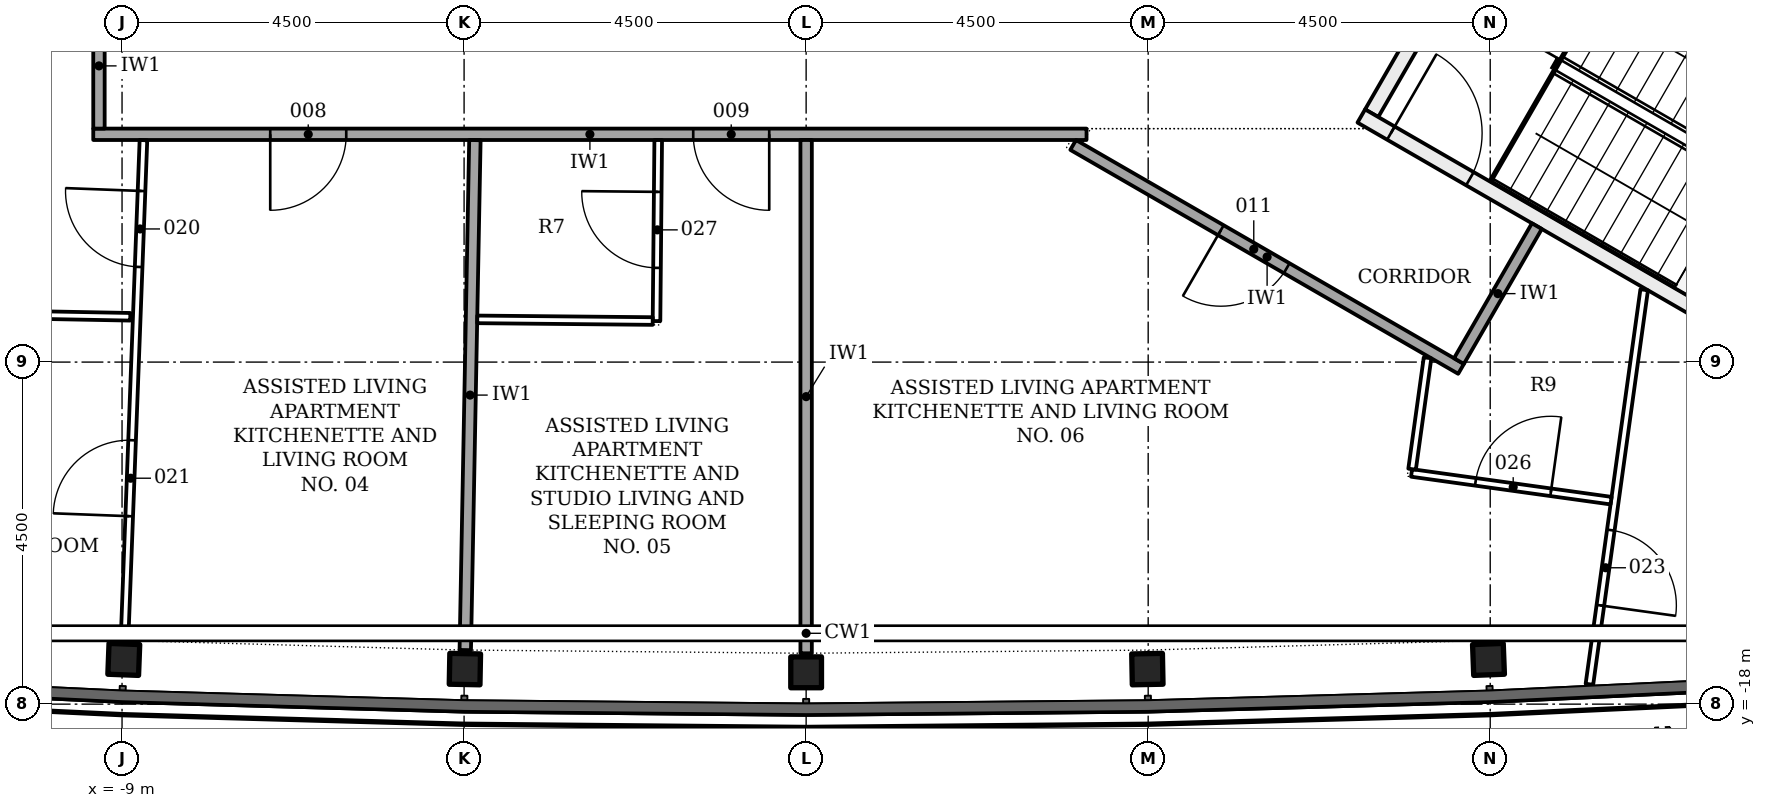
"""IFC4 building model, lengths in metres.
Left out: names, types, materials, properties, quantities, classifications, styles, units other than length and angle.
Written with IfcOpenShell. Run it as: python <this file> out.ifc"""

import sys

from ifc_helpers import new_model, si_unit, direction, frame, frame_2d, origin, origin_2d, place, context, subcontext, project, spatial, rectangle, i_section, extrude, element, fill, save


model = new_model("IFC4")
c1 = context("Model", 3, precision=1e-05, world=origin(), true_north=direction((0.0, 1.0)))
c2 = subcontext(c1, "Body", "Model", "MODEL_VIEW")
j1 = project(units=[si_unit("LENGTHUNIT", "METRE"), si_unit("PLANEANGLEUNIT", "RADIAN")], contexts=[c1])
p1 = place(None, origin())
s1 = spatial("IfcSite", under=j1, at=p1, CompositionType="ELEMENT")
p2 = place(p1, origin())
s2 = spatial("IfcBuilding", under=s1, at=p2, CompositionType="ELEMENT")
p3 = place(p2, frame((0.0, 0.0, 45.6)))
s3 = spatial("IfcBuildingStorey", under=s2, at=p3, CompositionType="ELEMENT", Elevation=45.6)
for number, where, z_axis, x_axis in (
    (1, (-9.922, -5.728, -0.2), (0.0, 0.0, 1.0), (-0.866, -0.5, 0.0)),
    (2, (9.922, -5.728, -0.2), (0.0, 0.0, 1.0), (0.866, -0.5, 0.0)),
):
    element("IfcWall", number, at=place(p3, frame(where, z_axis=z_axis, x_axis=x_axis)), inside=s3, PredefinedType="SHEAR", context=c2, shape_type="SweptSolid", body=[
        extrude(rectangle(XDim=14.013, YDim=0.85, at=frame_2d((7.007, 0.0))), origin(), (0.0, 0.0, 1.0), 3.6),
    ])
for number, where, z_axis, x_axis in (
    (3, (-8.977, -17.411, -0.2), (0.0, 0.0, 1.0), (0.999, -0.038, 0.0)),
    (4, (-4.489, -17.539, -0.2), (0.0, 0.0, 1.0), (1.0, -0.019, 0.0)),
    (5, (0.0, -17.581, -0.2), (0.0, 0.0, 1.0), (1.0, 0.0, 0.0)),
    (6, (4.489, -17.539, -0.2), (0.0, 0.0, 1.0), (1.0, 0.019, 0.0)),
    (7, (8.977, -17.411, -0.2), (0.0, 0.0, 1.0), (0.999, 0.038, 0.0)),
):
    element("IfcColumn", number, at=place(p3, frame(where, z_axis=z_axis, x_axis=x_axis)), inside=s3, PredefinedType="COLUMN", context=c2, shape_type="SweptSolid", body=[
        extrude(i_section(OverallWidth=0.404, OverallDepth=0.406, WebThickness=0.027, FlangeThickness=0.044, FilletRadius=0.015, at=origin_2d()), origin(), (0.0, 0.0, 1.0), 3.6),
    ])
p4 = place(p3, frame((7.44, -10.226, -0.2), z_axis=(0.0, 0.0, 1.0), x_axis=(0.500022077904, 0.866012656725, 0.0)))
e8 = element("IfcWall", 8, at=p4, inside=s3, PredefinedType="SHEAR", context=c2, shape_type="SweptSolid", body=[
    extrude(rectangle(XDim=3.55, YDim=0.2, at=frame_2d((1.775, 0.0))), origin(), (0.0, 0.0, 1.0), 3.6),
])
p5 = place(p4, frame((1.175, 0.0, 0.2)))
e9 = element("IfcOpeningElement", 9, at=p5, cuts=e8, PredefinedType="OPENING", context=c2, shape_type="SweptSolid", body=[
    extrude(rectangle(XDim=1.2, YDim=2.1, at=frame_2d((0.6, 1.05))), frame((0.0, 0.11, 0.0), z_axis=(0.0, -1.0, 0.0), x_axis=(1.0, 0.0, 0.0)), (0.0, 0.0, 1.0), 0.22),
])
p6 = place(p3, frame((7.304, -10.262, -0.2), z_axis=(0.0, 0.0, 1.0), x_axis=(0.866026594901, -0.49999793692, 0.0)))
e10 = element("IfcWall", 10, at=p6, inside=s3, PredefinedType="SHEAR", context=c2, shape_type="SweptSolid", body=[
    extrude(rectangle(XDim=5.6, YDim=0.2, at=frame_2d((2.8, 0.0))), origin(), (0.0, 0.0, 1.0), 3.6),
])
p7 = place(p6, frame((0.45, 0.0, 0.2)))
e11 = element("IfcOpeningElement", 11, at=p7, cuts=e10, PredefinedType="OPENING", context=c2, shape_type="SweptSolid", body=[
    extrude(rectangle(XDim=1.2, YDim=2.1, at=frame_2d((0.6, 1.05))), frame((0.0, 0.11, 0.0), z_axis=(0.0, -1.0, 0.0), x_axis=(1.0, 0.0, 0.0)), (0.0, 0.0, 1.0), 0.22),
])
p8 = place(p3, frame((9.419, -6.599, -0.2), z_axis=(0.0, 0.0, 1.0), x_axis=(0.866033125095, -0.499986626058, 0.0)))
e12 = element("IfcWall", 12, at=p8, inside=s3, PredefinedType="SHEAR", context=c2, shape_type="SweptSolid", body=[
    extrude(rectangle(XDim=7.2, YDim=1.161, at=frame_2d((3.6, 0.0))), origin(), (0.0, 0.0, 1.0), 3.6),
])
p9 = place(p3, frame((3.689, -10.503, 0.0), z_axis=(0.0, 0.0, 1.0), x_axis=(-1.0, 0.0, 0.0)))
e13 = element("IfcWall", 13, at=p9, inside=s3, PredefinedType="PARTITIONING", context=c2, shape_type="SweptSolid", body=[
    extrude(rectangle(XDim=13.068, YDim=0.15, at=frame_2d((6.534, 0.0))), origin(), (0.0, 0.0, 1.0), 2.778),
])
p10 = place(p9, frame((9.74, 0.0, 0.0)))
e14 = element("IfcOpeningElement", 14, at=p10, cuts=e13, PredefinedType="OPENING", context=c2, shape_type="SweptSolid", body=[
    extrude(rectangle(XDim=1.0, YDim=2.1, at=frame_2d((0.5, 1.05))), frame((0.0, 0.085, 0.0), z_axis=(0.0, -1.0, 0.0), x_axis=(1.0, 0.0, 0.0)), (0.0, 0.0, 1.0), 0.17),
])
p11 = place(p9, frame((4.175, 0.0, 0.0)))
e15 = element("IfcOpeningElement", 15, at=p11, cuts=e13, PredefinedType="OPENING", context=c2, shape_type="SweptSolid", body=[
    extrude(rectangle(XDim=1.0, YDim=2.1, at=frame_2d((0.5, 1.05))), frame((0.0, 0.085, 0.0), z_axis=(0.0, -1.0, 0.0), x_axis=(1.0, 0.0, 0.0)), (0.0, 0.0, 1.0), 0.17),
])
p12 = place(p3, frame((8.616, -13.589, 0.0), z_axis=(0.0, 0.0, 1.0), x_axis=(-0.866039313704, 0.499975906538, 0.0)))
e16 = element("IfcWall", 16, at=p12, inside=s3, PredefinedType="PARTITIONING", context=c2, shape_type="SweptSolid", body=[
    extrude(rectangle(XDim=5.892, YDim=0.15, at=frame_2d((2.946, 0.0))), origin(), (0.0, 0.0, 1.0), 2.778),
])
p13 = place(p12, frame((2.649, 0.0, 0.0)))
e17 = element("IfcOpeningElement", 17, at=p13, cuts=e16, PredefinedType="OPENING", context=c2, shape_type="SweptSolid", body=[
    extrude(rectangle(XDim=1.0, YDim=2.1, at=frame_2d((0.5, 1.05))), frame((0.0, 0.085, 0.0), z_axis=(0.0, -1.0, 0.0), x_axis=(1.0, 0.0, 0.0)), (0.0, 0.0, 1.0), 0.17),
])
p14 = place(p3, frame((8.589, -13.487, 0.0), z_axis=(0.0, 0.0, 1.0), x_axis=(0.499956128963, 0.866050731258, 0.0)))
e18 = element("IfcWall", 18, at=p14, inside=s3, PredefinedType="PARTITIONING", context=c2, shape_type="SweptSolid", body=[
    extrude(rectangle(XDim=2.05, YDim=0.15, at=frame_2d((1.025, 0.0))), origin(), (0.0, 0.0, 1.0), 2.923),
])
p15 = place(p3, frame((-9.304, -10.428, 0.0), z_axis=(0.0, 0.0, 1.0), x_axis=(0.0, 1.0, 0.0)))
e19 = element("IfcWall", 19, at=p15, inside=s3, PredefinedType="PARTITIONING", context=c2, shape_type="SweptSolid", body=[
    extrude(rectangle(XDim=1.65, YDim=0.15, at=frame_2d((0.825, 0.0))), origin(), (0.0, 0.0, 1.0), 3.4),
])
p16 = place(p3, frame((0.0, -17.331, 0.0), z_axis=(0.0, 0.0, 1.0), x_axis=(0.0, 1.0, 0.0)))
e20 = element("IfcWall", 20, at=p16, inside=s3, PredefinedType="PARTITIONING", context=c2, shape_type="SweptSolid", body=[
    extrude(rectangle(XDim=6.753, YDim=0.15, at=frame_2d((3.376, 0.0))), origin(), (0.0, 0.0, 1.0), 2.778),
])
p17 = place(p3, frame((-4.485, -17.289, 0.0), z_axis=(0.0, 0.0, 1.0), x_axis=(0.018918777789, 0.999821023907, 0.0)))
e21 = element("IfcWall", 21, at=p17, inside=s3, PredefinedType="PARTITIONING", context=c2, shape_type="SweptSolid", body=[
    extrude(rectangle(XDim=6.71, YDim=0.15, at=frame_2d((3.355, 0.0))), origin(), (0.0, 0.0, 1.0), 2.778),
])
p18 = place(p3, frame((-21.017, -12.675, 0.0), z_axis=(0.0, 0.0, 1.0), x_axis=(0.999821316728, -0.018903296414, 0.0)))
e22 = element("IfcWall", 22, at=p18, inside=s3, PredefinedType="PARTITIONING", context=c2, shape_type="SweptSolid", body=[
    extrude(rectangle(XDim=12.127, YDim=0.1, at=frame_2d((6.064, 0.0))), origin(), (0.0, 0.0, 1.0), 2.778),
])
p19 = place(p18, frame((3.739, 0.0, 0.0)))
e23 = element("IfcOpeningElement", 23, at=p19, cuts=e22, PredefinedType="OPENING", context=c2, shape_type="SweptSolid", body=[
    extrude(rectangle(XDim=1.0, YDim=2.1, at=frame_2d((0.5, 1.05))), frame((0.0, 0.06, 0.0), z_axis=(0.0, -1.0, 0.0), x_axis=(1.0, 0.0, 0.0)), (0.0, 0.0, 1.0), 0.12),
])
p20 = place(p3, frame((-8.968, -17.162, 0.0), z_axis=(0.0, 0.0, 1.0), x_axis=(0.037809580141, 0.999284962185, 0.0)))
e24 = element("IfcWall", 24, at=p20, inside=s3, PredefinedType="PARTITIONING", context=c2, shape_type="SweptSolid", body=[
    extrude(rectangle(XDim=6.586, YDim=0.1, at=frame_2d((3.293, 0.0))), origin(), (0.0, 0.0, 1.0), 2.778),
])
p21 = place(p20, frame((4.917, 0.0, 0.0)))
e25 = element("IfcOpeningElement", 25, at=p21, cuts=e24, PredefinedType="OPENING", context=c2, shape_type="SweptSolid", body=[
    extrude(rectangle(XDim=1.0, YDim=2.1, at=frame_2d((0.5, 1.05))), frame((0.0, 0.06, 0.0), z_axis=(0.0, -1.0, 0.0), x_axis=(1.0, 0.0, 0.0)), (0.0, 0.0, 1.0), 0.12),
])
p22 = place(p20, frame((1.635, 0.0, 0.0)))
e26 = element("IfcOpeningElement", 26, at=p22, cuts=e24, PredefinedType="OPENING", context=c2, shape_type="SweptSolid", body=[
    extrude(rectangle(XDim=1.0, YDim=2.1, at=frame_2d((0.5, 1.05))), frame((0.0, 0.06, 0.0), z_axis=(0.0, -1.0, 0.0), x_axis=(1.0, 0.0, 0.0)), (0.0, 0.0, 1.0), 0.12),
])
p23 = place(p3, frame((11.026, -12.548, 0.0), z_axis=(0.0, 0.0, 1.0), x_axis=(-0.137526474089, -0.990498091328, 0.0)))
e27 = element("IfcWall", 27, at=p23, inside=s3, PredefinedType="PARTITIONING", context=c2, shape_type="SweptSolid", body=[
    extrude(rectangle(XDim=5.24, YDim=0.1, at=frame_2d((2.62, 0.0))), origin(), (0.0, 0.0, 1.0), 2.974),
])
p24 = place(p23, frame((3.192, 0.0, 0.0)))
e28 = element("IfcOpeningElement", 28, at=p24, cuts=e27, PredefinedType="OPENING", context=c2, shape_type="SweptSolid", body=[
    extrude(rectangle(XDim=1.0, YDim=2.1, at=frame_2d((0.5, 1.05))), frame((0.0, 0.06, 0.0), z_axis=(0.0, -1.0, 0.0), x_axis=(1.0, 0.0, 0.0)), (0.0, 0.0, 1.0), 0.12),
])
p25 = place(p3, frame((7.965, -14.958, 0.0), z_axis=(0.0, 0.0, 1.0), x_axis=(0.990494714026, -0.137550796023, 0.0)))
e29 = element("IfcWall", 29, at=p25, inside=s3, PredefinedType="PARTITIONING", context=c2, shape_type="SweptSolid", body=[
    extrude(rectangle(XDim=2.65, YDim=0.1, at=frame_2d((1.325, 0.0))), origin(), (0.0, 0.0, 1.0), 2.923),
])
p26 = place(p25, frame((0.85, 0.0, 0.0)))
e30 = element("IfcOpeningElement", 30, at=p26, cuts=e29, PredefinedType="OPENING", context=c2, shape_type="SweptSolid", body=[
    extrude(rectangle(XDim=1.0, YDim=2.1, at=frame_2d((0.5, 1.05))), frame((0.0, 0.06, 0.0), z_axis=(0.0, -1.0, 0.0), x_axis=(1.0, 0.0, 0.0)), (0.0, 0.0, 1.0), 0.12),
])
p27 = place(p3, frame((-1.969, -12.96, 0.0), z_axis=(0.0, 0.0, 1.0), x_axis=(0.009429675035, 0.999955539626, 0.0)))
e31 = element("IfcWall", 31, at=p27, inside=s3, PredefinedType="PARTITIONING", context=c2, shape_type="SweptSolid", body=[
    extrude(rectangle(XDim=2.382, YDim=0.1, at=frame_2d((1.191, 0.0))), origin(), (0.0, 0.0, 1.0), 3.4),
])
p28 = place(p27, frame((0.7, 0.0, 0.0)))
e32 = element("IfcOpeningElement", 32, at=p28, cuts=e31, PredefinedType="OPENING", context=c2, shape_type="SweptSolid", body=[
    extrude(rectangle(XDim=1.0, YDim=2.1, at=frame_2d((0.5, 1.05))), frame((0.0, 0.06, 0.0), z_axis=(0.0, -1.0, 0.0), x_axis=(1.0, 0.0, 0.0)), (0.0, 0.0, 1.0), 0.12),
])
p29 = place(p3, frame((-4.327, -12.938, 0.0), z_axis=(0.0, 0.0, 1.0), x_axis=(0.999954699557, -0.009518341931, 0.0)))
e33 = element("IfcWall", 33, at=p29, inside=s3, PredefinedType="PARTITIONING", context=c2, shape_type="SweptSolid", body=[
    extrude(rectangle(XDim=2.308, YDim=0.1, at=frame_2d((1.154, 0.0))), origin(), (0.0, 0.0, 1.0), 2.778),
])
p30 = place(p3, frame((8.176, -13.443, 0.0), z_axis=(0.0, 0.0, 1.0), x_axis=(-0.137586354535, -0.990489775336, 0.0)))
e34 = element("IfcWall", 34, at=p30, inside=s3, PredefinedType="PARTITIONING", context=c2, shape_type="SweptSolid", body=[
    extrude(rectangle(XDim=1.48, YDim=0.1, at=frame_2d((0.74, 0.0))), origin(), (0.0, 0.0, 1.0), 3.4),
])
p31 = place(p7, origin())
e35 = element("IfcDoor", 35, at=p31, inside=s3, OperationType="SINGLE_SWING_LEFT", PredefinedType="DOOR", context=c2, shape_type="SweptSolid", body=[
    extrude(rectangle(XDim=1.2, YDim=2.1, at=frame_2d((0.6, 1.05))), frame((0.0, 0.025, 0.0), z_axis=(0.0, -1.0, 0.0), x_axis=(1.0, 0.0, 0.0)), (0.0, 0.0, 1.0), 0.05),
])
fill(e11, e35)
p32 = place(p10, origin())
e36 = element("IfcDoor", 36, at=p32, inside=s3, OperationType="SINGLE_SWING_RIGHT", PredefinedType="DOOR", context=c2, shape_type="SweptSolid", body=[
    extrude(rectangle(XDim=1.0, YDim=2.1, at=frame_2d((0.5, 1.05))), frame((0.0, 0.025, 0.0), z_axis=(0.0, -1.0, 0.0), x_axis=(1.0, 0.0, 0.0)), (0.0, 0.0, 1.0), 0.05),
])
fill(e14, e36)
p33 = place(p11, origin())
e37 = element("IfcDoor", 37, at=p33, inside=s3, OperationType="SINGLE_SWING_LEFT", PredefinedType="DOOR", context=c2, shape_type="SweptSolid", body=[
    extrude(rectangle(XDim=1.0, YDim=2.1, at=frame_2d((0.5, 1.05))), frame((0.0, 0.025, 0.0), z_axis=(0.0, -1.0, 0.0), x_axis=(1.0, 0.0, 0.0)), (0.0, 0.0, 1.0), 0.05),
])
fill(e15, e37)
p34 = place(p13, origin())
e38 = element("IfcDoor", 38, at=p34, inside=s3, OperationType="SINGLE_SWING_RIGHT", PredefinedType="DOOR", context=c2, shape_type="SweptSolid", body=[
    extrude(rectangle(XDim=1.0, YDim=2.1, at=frame_2d((0.5, 1.05))), frame((0.0, 0.025, 0.0), z_axis=(0.0, -1.0, 0.0), x_axis=(1.0, 0.0, 0.0)), (0.0, 0.0, 1.0), 0.05),
])
fill(e17, e38)
p35 = place(p21, origin())
e39 = element("IfcDoor", 39, at=p35, inside=s3, OperationType="SINGLE_SWING_RIGHT", PredefinedType="DOOR", context=c2, shape_type="SweptSolid", body=[
    extrude(rectangle(XDim=1.0, YDim=2.1, at=frame_2d((0.5, 1.05))), frame((0.0, 0.025, 0.0), z_axis=(0.0, -1.0, 0.0), x_axis=(1.0, 0.0, 0.0)), (0.0, 0.0, 1.0), 0.05),
])
fill(e25, e39)
p36 = place(p22, origin())
e40 = element("IfcDoor", 40, at=p36, inside=s3, OperationType="SINGLE_SWING_LEFT", PredefinedType="DOOR", context=c2, shape_type="SweptSolid", body=[
    extrude(rectangle(XDim=1.0, YDim=2.1, at=frame_2d((0.5, 1.05))), frame((0.0, 0.025, 0.0), z_axis=(0.0, -1.0, 0.0), x_axis=(1.0, 0.0, 0.0)), (0.0, 0.0, 1.0), 0.05),
])
fill(e26, e40)
p37 = place(p24, origin())
e41 = element("IfcDoor", 41, at=p37, inside=s3, OperationType="SINGLE_SWING_RIGHT", PredefinedType="DOOR", context=c2, shape_type="SweptSolid", body=[
    extrude(rectangle(XDim=1.0, YDim=2.1, at=frame_2d((0.5, 1.05))), frame((0.0, 0.025, 0.0), z_axis=(0.0, -1.0, 0.0), x_axis=(1.0, 0.0, 0.0)), (0.0, 0.0, 1.0), 0.05),
])
fill(e28, e41)
p38 = place(p26, origin())
e42 = element("IfcDoor", 42, at=p38, inside=s3, OperationType="SINGLE_SWING_RIGHT", PredefinedType="DOOR", context=c2, shape_type="SweptSolid", body=[
    extrude(rectangle(XDim=1.0, YDim=2.1, at=frame_2d((0.5, 1.05))), frame((0.0, 0.025, 0.0), z_axis=(0.0, -1.0, 0.0), x_axis=(1.0, 0.0, 0.0)), (0.0, 0.0, 1.0), 0.05),
])
fill(e30, e42)
p39 = place(p28, origin())
e43 = element("IfcDoor", 43, at=p39, inside=s3, OperationType="SINGLE_SWING_RIGHT", PredefinedType="DOOR", context=c2, shape_type="SweptSolid", body=[
    extrude(rectangle(XDim=1.0, YDim=2.1, at=frame_2d((0.5, 1.05))), frame((0.0, 0.025, 0.0), z_axis=(0.0, -1.0, 0.0), x_axis=(1.0, 0.0, 0.0)), (0.0, 0.0, 1.0), 0.05),
])
fill(e32, e43)
save(model, sys.argv[1])
